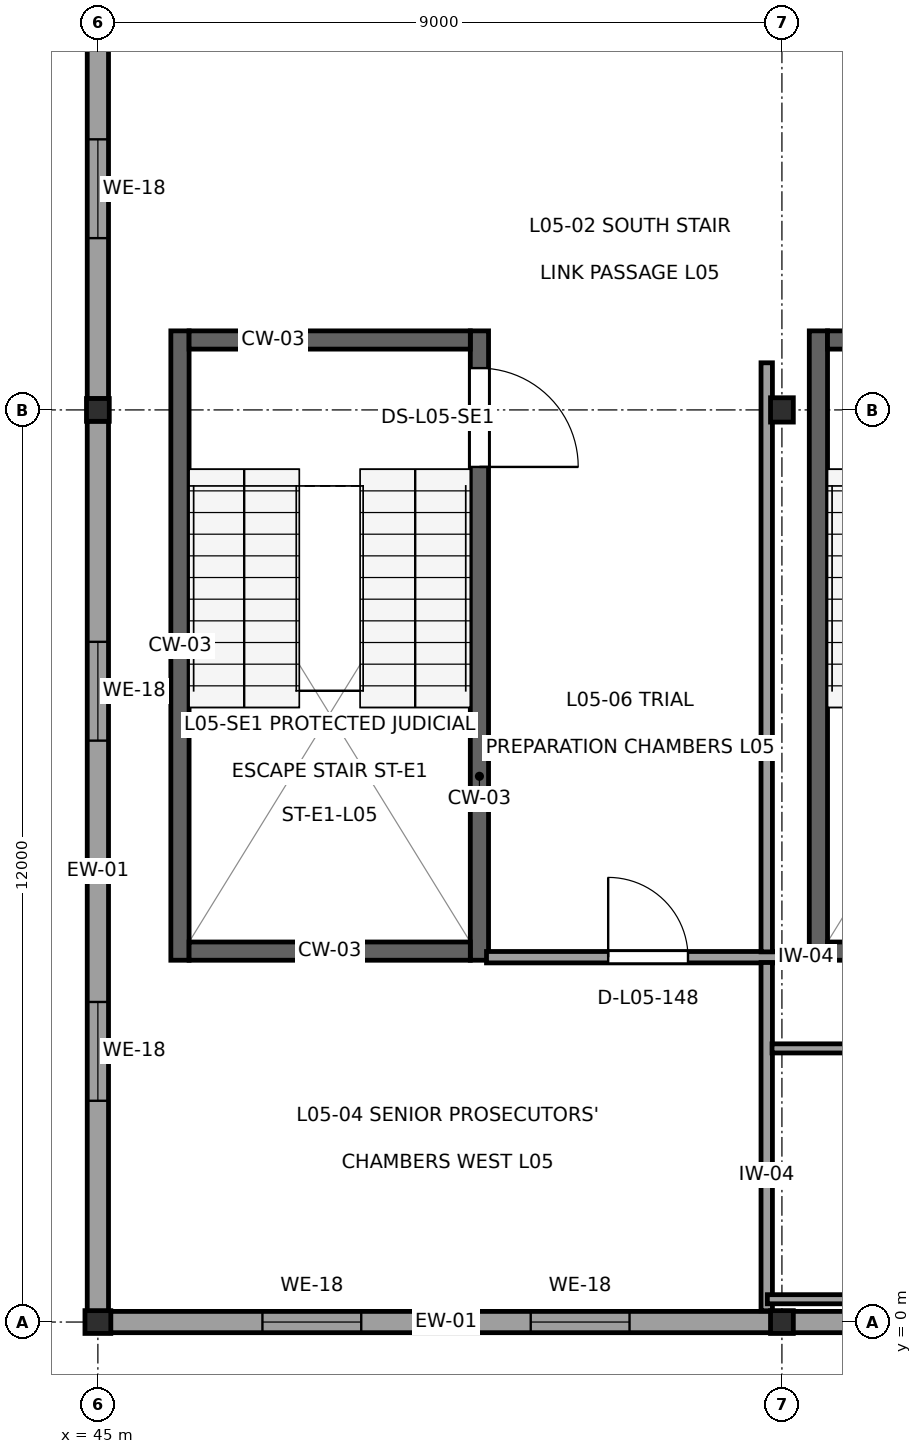
"""IFC4 building model, lengths in metres.
Left out: names, types, materials, properties, quantities, classifications, styles, units other than length and angle.
Written with IfcOpenShell. Run it as: python <this file> out.ifc"""

import sys

from ifc_helpers import new_model, si_unit, direction, frame, frame_2d, origin, origin_2d, place, context, subcontext, project, spatial, rectangle, i_section, extrude, element, fill, save


model = new_model("IFC4")
c1 = context("Model", 3, precision=1e-05, world=origin(), true_north=direction((0.0, 1.0)))
c2 = subcontext(c1, "Body", "Model", "MODEL_VIEW")
j1 = project(units=[si_unit("LENGTHUNIT", "METRE"), si_unit("PLANEANGLEUNIT", "RADIAN")], contexts=[c1])
p1 = place(None, origin())
s1 = spatial("IfcSite", under=j1, at=p1, CompositionType="ELEMENT")
p2 = place(p1, origin())
s2 = spatial("IfcBuilding", under=s1, at=p2, CompositionType="ELEMENT")
p3 = place(p2, frame((0.0, 0.0, 23.4)))
s3 = spatial("IfcBuildingStorey", under=s2, at=p3, CompositionType="ELEMENT", Elevation=23.4)
p4 = place(p3, frame((45.0, 0.0, 0.0), z_axis=(0.0, 0.0, 1.0), x_axis=(0.0, 1.0, 0.0)))
e1 = element("IfcColumn", 1, at=p4, inside=s3, PredefinedType="COLUMN", context=c2, shape_type="SweptSolid", body=[
    extrude(i_section(OverallWidth=0.3, OverallDepth=0.34, WebThickness=0.012, FlangeThickness=0.021, at=origin_2d()), origin(), (0.0, 0.0, 1.0), 4.0),
])
for number, where, z_axis, x_axis in (
    (2, (45.0, 12.0, 0.0), (0.0, 0.0, 1.0), (1.0, 0.0, 0.0)),
    (3, (54.0, 0.0, 0.0), (0.0, 0.0, 1.0), (1.0, 0.0, 0.0)),
):
    element("IfcColumn", number, at=place(p3, frame(where, z_axis=z_axis, x_axis=x_axis)), inside=s3, PredefinedType="COLUMN", context=c2, shape_type="SweptSolid", body=[
        extrude(i_section(OverallWidth=0.3, OverallDepth=0.3, WebThickness=0.011, FlangeThickness=0.019, at=origin_2d()), origin(), (0.0, 0.0, 1.0), 4.0),
    ])
p5 = place(p3, frame((54.0, 12.0, 0.0), z_axis=(0.0, 0.0, 1.0), x_axis=(1.0, 0.0, 0.0)))
e4 = element("IfcColumn", 4, at=p5, inside=s3, PredefinedType="COLUMN", context=c2, shape_type="SweptSolid", body=[
    extrude(i_section(OverallWidth=0.3, OverallDepth=0.32, WebThickness=0.011, FlangeThickness=0.021, at=origin_2d()), origin(), (0.0, 0.0, 1.0), 4.0),
])
p6 = place(p3, frame((45.168, 0.0, 0.0), z_axis=(0.0, 0.0, 1.0), x_axis=(1.0, 0.0, 0.0)))
e5 = element("IfcWall", 5, at=p6, inside=s3, PredefinedType="SOLIDWALL", context=c2, shape_type="SweptSolid", body=[
    extrude(rectangle(XDim=8.824, YDim=0.28, at=frame_2d((4.412, 0.0))), origin(), (0.0, 0.0, 1.0), 2.747),
])
p7 = place(p6, frame((1.997, 0.0, 0.9)))
e6 = element("IfcOpeningElement", 6, at=p7, cuts=e5, PredefinedType="OPENING", context=c2, shape_type="SweptSolid", body=[
    extrude(rectangle(XDim=1.3, YDim=1.3, at=frame_2d((0.65, 0.65))), frame((0.0, 0.155, 0.0), z_axis=(0.0, -1.0, 0.0), x_axis=(1.0, 0.0, 0.0)), (0.0, 0.0, 1.0), 0.31),
])
p8 = place(p6, frame((5.527, 0.0, 0.9)))
e7 = element("IfcOpeningElement", 7, at=p8, cuts=e5, PredefinedType="OPENING", context=c2, shape_type="SweptSolid", body=[
    extrude(rectangle(XDim=1.3, YDim=1.3, at=frame_2d((0.65, 0.65))), frame((0.0, 0.155, 0.0), z_axis=(0.0, -1.0, 0.0), x_axis=(1.0, 0.0, 0.0)), (0.0, 0.0, 1.0), 0.31),
])
p9 = place(p3, frame((54.008, 0.0, 0.0), z_axis=(0.0, 0.0, 1.0), x_axis=(1.0, 0.0, 0.0)))
e8 = element("IfcWall", 8, at=p9, inside=s3, PredefinedType="SOLIDWALL", context=c2, shape_type="SweptSolid", body=[
    extrude(rectangle(XDim=8.984, YDim=0.28, at=frame_2d((4.492, 0.0))), origin(), (0.0, 0.0, 1.0), 2.747),
])
p10 = place(p9, frame((2.045, 0.0, 0.9)))
e9 = element("IfcOpeningElement", 9, at=p10, cuts=e8, PredefinedType="OPENING", context=c2, shape_type="SweptSolid", body=[
    extrude(rectangle(XDim=1.3, YDim=1.3, at=frame_2d((0.65, 0.65))), frame((0.0, 0.155, 0.0), z_axis=(0.0, -1.0, 0.0), x_axis=(1.0, 0.0, 0.0)), (0.0, 0.0, 1.0), 0.31),
])
p11 = place(p9, frame((5.639, 0.0, 0.9)))
e10 = element("IfcOpeningElement", 10, at=p11, cuts=e8, PredefinedType="OPENING", context=c2, shape_type="SweptSolid", body=[
    extrude(rectangle(XDim=1.3, YDim=1.3, at=frame_2d((0.65, 0.65))), frame((0.0, 0.155, 0.0), z_axis=(0.0, -1.0, 0.0), x_axis=(1.0, 0.0, 0.0)), (0.0, 0.0, 1.0), 0.31),
])
p12 = place(p3, frame((45.0, 23.677, 0.0), z_axis=(0.0, 0.0, 1.0), x_axis=(0.0, -1.0, 0.0)))
e11 = element("IfcWall", 11, at=p12, inside=s3, PredefinedType="SOLIDWALL", context=c2, shape_type="SweptSolid", body=[
    extrude(rectangle(XDim=11.529, YDim=0.28, at=frame_2d((5.765, 0.0))), origin(), (0.0, 0.0, 1.0), 3.155),
])
p13 = place(p12, frame((2.809, 0.0, 0.9)))
e12 = element("IfcOpeningElement", 12, at=p13, cuts=e11, PredefinedType="OPENING", context=c2, shape_type="SweptSolid", body=[
    extrude(rectangle(XDim=1.3, YDim=1.3, at=frame_2d((0.65, 0.65))), frame((0.0, 0.155, 0.0), z_axis=(0.0, -1.0, 0.0), x_axis=(1.0, 0.0, 0.0)), (0.0, 0.0, 1.0), 0.31),
])
p14 = place(p12, frame((8.117, 0.0, 0.9)))
e13 = element("IfcOpeningElement", 13, at=p14, cuts=e11, PredefinedType="OPENING", context=c2, shape_type="SweptSolid", body=[
    extrude(rectangle(XDim=1.3, YDim=1.3, at=frame_2d((0.65, 0.65))), frame((0.0, 0.155, 0.0), z_axis=(0.0, -1.0, 0.0), x_axis=(1.0, 0.0, 0.0)), (0.0, 0.0, 1.0), 0.31),
])
p15 = place(p3, frame((45.0, 11.852, 0.0), z_axis=(0.0, 0.0, 1.0), x_axis=(0.0, -1.0, 0.0)))
e14 = element("IfcWall", 14, at=p15, inside=s3, PredefinedType="SOLIDWALL", context=c2, shape_type="SweptSolid", body=[
    extrude(rectangle(XDim=11.844, YDim=0.28, at=frame_2d((5.922, 0.0))), origin(), (0.0, 0.0, 1.0), 3.155),
])
p16 = place(p15, frame((2.903, 0.0, 0.9)))
e15 = element("IfcOpeningElement", 15, at=p16, cuts=e14, PredefinedType="OPENING", context=c2, shape_type="SweptSolid", body=[
    extrude(rectangle(XDim=1.3, YDim=1.3, at=frame_2d((0.65, 0.65))), frame((0.0, 0.155, 0.0), z_axis=(0.0, -1.0, 0.0), x_axis=(1.0, 0.0, 0.0)), (0.0, 0.0, 1.0), 0.31),
])
p17 = place(p15, frame((7.641, 0.0, 0.9)))
e16 = element("IfcOpeningElement", 16, at=p17, cuts=e14, PredefinedType="OPENING", context=c2, shape_type="SweptSolid", body=[
    extrude(rectangle(XDim=1.3, YDim=1.3, at=frame_2d((0.65, 0.65))), frame((0.0, 0.155, 0.0), z_axis=(0.0, -1.0, 0.0), x_axis=(1.0, 0.0, 0.0)), (0.0, 0.0, 1.0), 0.31),
])
p18 = place(p3, frame((54.48, 4.76, 0.0), z_axis=(0.0, 0.0, 1.0), x_axis=(0.0, 1.0, 0.0)))
e17 = element("IfcWall", 17, at=p18, inside=s3, PredefinedType="SHEAR", context=c2, shape_type="SweptSolid", body=[
    extrude(rectangle(XDim=8.28, YDim=0.24, at=frame_2d((4.14, 0.0))), origin(), (0.0, 0.0, 1.0), 3.81),
])
for number, where, z_axis, x_axis in (
    (18, (54.6, 4.88, 0.0), (0.0, 0.0, 1.0), (1.0, 0.0, 0.0)),
    (19, (54.6, 12.92, 0.0), (0.0, 0.0, 1.0), (1.0, 0.0, 0.0)),
):
    element("IfcWall", number, at=place(p3, frame(where, z_axis=z_axis, x_axis=x_axis)), inside=s3, PredefinedType="SHEAR", context=c2, shape_type="SweptSolid", body=[
        extrude(rectangle(XDim=3.7, YDim=0.24, at=frame_2d((1.85, 0.0))), origin(), (0.0, 0.0, 1.0), 3.81),
    ])
p19 = place(p3, frame((46.08, 4.76, 0.0), z_axis=(0.0, 0.0, 1.0), x_axis=(0.0, 1.0, 0.0)))
e20 = element("IfcWall", 20, at=p19, inside=s3, PredefinedType="SHEAR", context=c2, shape_type="SweptSolid", body=[
    extrude(rectangle(XDim=8.28, YDim=0.24, at=frame_2d((4.14, 0.0))), origin(), (0.0, 0.0, 1.0), 3.81),
])
p20 = place(p3, frame((50.02, 4.76, 0.0), z_axis=(0.0, 0.0, 1.0), x_axis=(0.0, 1.0, 0.0)))
e21 = element("IfcWall", 21, at=p20, inside=s3, PredefinedType="SHEAR", context=c2, shape_type="SweptSolid", body=[
    extrude(rectangle(XDim=8.28, YDim=0.24, at=frame_2d((4.14, 0.0))), origin(), (0.0, 0.0, 1.0), 3.81),
])
p21 = place(p20, frame((6.49, 0.0, 0.0)))
e22 = element("IfcOpeningElement", 22, at=p21, cuts=e21, PredefinedType="OPENING", context=c2, shape_type="SweptSolid", body=[
    extrude(rectangle(XDim=1.3, YDim=2.2, at=frame_2d((0.65, 1.1))), frame((0.0, 0.135, 0.0), z_axis=(0.0, -1.0, 0.0), x_axis=(1.0, 0.0, 0.0)), (0.0, 0.0, 1.0), 0.27),
])
for number, where, z_axis, x_axis in (
    (23, (46.2, 4.88, 0.0), (0.0, 0.0, 1.0), (1.0, 0.0, 0.0)),
    (24, (46.2, 12.92, 0.0), (0.0, 0.0, 1.0), (1.0, 0.0, 0.0)),
):
    element("IfcWall", number, at=place(p3, frame(where, z_axis=z_axis, x_axis=x_axis)), inside=s3, PredefinedType="SHEAR", context=c2, shape_type="SweptSolid", body=[
        extrude(rectangle(XDim=3.7, YDim=0.24, at=frame_2d((1.85, 0.0))), origin(), (0.0, 0.0, 1.0), 3.81),
    ])
p22 = place(p3, frame((50.113, 4.8, 0.0), z_axis=(0.0, 0.0, 1.0), x_axis=(1.0, 0.0, 0.0)))
e25 = element("IfcWall", 25, at=p22, inside=s3, PredefinedType="PARTITIONING", context=c2, shape_type="SweptSolid", body=[
    extrude(rectangle(XDim=4.252, YDim=0.15, at=frame_2d((2.126, 0.0))), origin(), (0.0, 0.0, 1.0), 3.64),
])
p23 = place(p22, frame((1.601, 0.0, 0.0)))
e26 = element("IfcOpeningElement", 26, at=p23, cuts=e25, PredefinedType="OPENING", context=c2, shape_type="SweptSolid", body=[
    extrude(rectangle(XDim=1.05, YDim=2.25, at=frame_2d((0.525, 1.125))), frame((0.0, 0.09, 0.0), z_axis=(0.0, -1.0, 0.0), x_axis=(1.0, 0.0, 0.0)), (0.0, 0.0, 1.0), 0.18),
])
p24 = place(p3, frame((53.8, 4.73, 0.0), z_axis=(0.0, 0.0, 1.0), x_axis=(0.0, -1.0, 0.0)))
e27 = element("IfcWall", 27, at=p24, inside=s3, PredefinedType="PARTITIONING", context=c2, shape_type="SweptSolid", body=[
    extrude(rectangle(XDim=4.582, YDim=0.15, at=frame_2d((2.291, 0.0))), origin(), (0.0, 0.0, 1.0), 3.405),
])
p25 = place(p3, frame((107.721, 0.3, 0.0), z_axis=(0.0, 0.0, 1.0), x_axis=(-1.0, 0.0, 0.0)))
e28 = element("IfcWall", 28, at=p25, inside=s3, PredefinedType="PARTITIONING", context=c2, shape_type="SweptSolid", body=[
    extrude(rectangle(XDim=53.913, YDim=0.12, at=frame_2d((26.957, 0.0))), origin(), (0.0, 0.0, 1.0), 3.64),
])
p26 = place(p3, frame((53.87, 3.6, 0.0), z_axis=(0.0, 0.0, 1.0), x_axis=(1.0, 0.0, 0.0)))
e29 = element("IfcWall", 29, at=p26, inside=s3, PredefinedType="PARTITIONING", context=c2, shape_type="SweptSolid", body=[
    extrude(rectangle(XDim=63.25, YDim=0.12, at=frame_2d((31.625, 0.0))), origin(), (0.0, 0.0, 1.0), 3.64),
])
p27 = place(p26, frame((19.855, 0.0, 0.0)))
e30 = element("IfcOpeningElement", 30, at=p27, cuts=e29, PredefinedType="OPENING", context=c2, shape_type="SweptSolid", body=[
    extrude(rectangle(XDim=0.95, YDim=2.15, at=frame_2d((0.475, 1.075))), frame((0.0, 0.075, 0.0), z_axis=(0.0, -1.0, 0.0), x_axis=(1.0, 0.0, 0.0)), (0.0, 0.0, 1.0), 0.15),
])
p28 = place(p3, frame((53.8, 12.62, 0.0), z_axis=(0.0, 0.0, 1.0), x_axis=(0.0, -1.0, 0.0)))
e31 = element("IfcWall", 31, at=p28, inside=s3, PredefinedType="PARTITIONING", context=c2, shape_type="SweptSolid", body=[
    extrude(rectangle(XDim=7.75, YDim=0.15, at=frame_2d((3.875, 0.0))), origin(), (0.0, 0.0, 1.0), 3.405),
])
p29 = place(p7, origin())
e32 = element("IfcWindow", 32, at=p29, inside=s3, PartitioningType="SINGLE_PANEL", PredefinedType="WINDOW", context=c2, shape_type="SweptSolid", body=[
    extrude(rectangle(XDim=1.3, YDim=1.3, at=frame_2d((0.65, 0.65))), frame((0.0, 0.03, 0.0), z_axis=(0.0, -1.0, 0.0), x_axis=(1.0, 0.0, 0.0)), (0.0, 0.0, 1.0), 0.06),
])
fill(e6, e32)
p30 = place(p8, origin())
e33 = element("IfcWindow", 33, at=p30, inside=s3, PartitioningType="SINGLE_PANEL", PredefinedType="WINDOW", context=c2, shape_type="SweptSolid", body=[
    extrude(rectangle(XDim=1.3, YDim=1.3, at=frame_2d((0.65, 0.65))), frame((0.0, 0.03, 0.0), z_axis=(0.0, -1.0, 0.0), x_axis=(1.0, 0.0, 0.0)), (0.0, 0.0, 1.0), 0.06),
])
fill(e7, e33)
p31 = place(p14, origin())
e34 = element("IfcWindow", 34, at=p31, inside=s3, PartitioningType="SINGLE_PANEL", PredefinedType="WINDOW", context=c2, shape_type="SweptSolid", body=[
    extrude(rectangle(XDim=1.3, YDim=1.3, at=frame_2d((0.65, 0.65))), frame((0.0, 0.03, 0.0), z_axis=(0.0, -1.0, 0.0), x_axis=(1.0, 0.0, 0.0)), (0.0, 0.0, 1.0), 0.06),
])
fill(e13, e34)
p32 = place(p16, origin())
e35 = element("IfcWindow", 35, at=p32, inside=s3, PartitioningType="SINGLE_PANEL", PredefinedType="WINDOW", context=c2, shape_type="SweptSolid", body=[
    extrude(rectangle(XDim=1.3, YDim=1.3, at=frame_2d((0.65, 0.65))), frame((0.0, 0.03, 0.0), z_axis=(0.0, -1.0, 0.0), x_axis=(1.0, 0.0, 0.0)), (0.0, 0.0, 1.0), 0.06),
])
fill(e15, e35)
p33 = place(p17, origin())
e36 = element("IfcWindow", 36, at=p33, inside=s3, PartitioningType="SINGLE_PANEL", PredefinedType="WINDOW", context=c2, shape_type="SweptSolid", body=[
    extrude(rectangle(XDim=1.3, YDim=1.3, at=frame_2d((0.65, 0.65))), frame((0.0, 0.03, 0.0), z_axis=(0.0, -1.0, 0.0), x_axis=(1.0, 0.0, 0.0)), (0.0, 0.0, 1.0), 0.06),
])
fill(e16, e36)
p34 = place(p21, frame((1.3, 0.0, 0.0), z_axis=(0.0, 0.0, 1.0), x_axis=(-1.0, 0.0, 0.0)))
e37 = element("IfcDoor", 37, at=p34, inside=s3, OperationType="SINGLE_SWING_LEFT", PredefinedType="DOOR", context=c2, shape_type="SweptSolid", body=[
    extrude(rectangle(XDim=1.3, YDim=2.2, at=frame_2d((0.65, 1.1))), frame((0.0, 0.025, 0.0), z_axis=(0.0, -1.0, 0.0), x_axis=(1.0, 0.0, 0.0)), (0.0, 0.0, 1.0), 0.05),
])
fill(e22, e37)
p35 = place(p23, origin())
e38 = element("IfcDoor", 38, at=p35, inside=s3, OperationType="SINGLE_SWING_LEFT", PredefinedType="DOOR", context=c2, shape_type="SweptSolid", body=[
    extrude(rectangle(XDim=1.05, YDim=2.25, at=frame_2d((0.525, 1.125))), frame((0.0, 0.025, 0.0), z_axis=(0.0, -1.0, 0.0), x_axis=(1.0, 0.0, 0.0)), (0.0, 0.0, 1.0), 0.05),
])
fill(e26, e38)
save(model, sys.argv[1])
